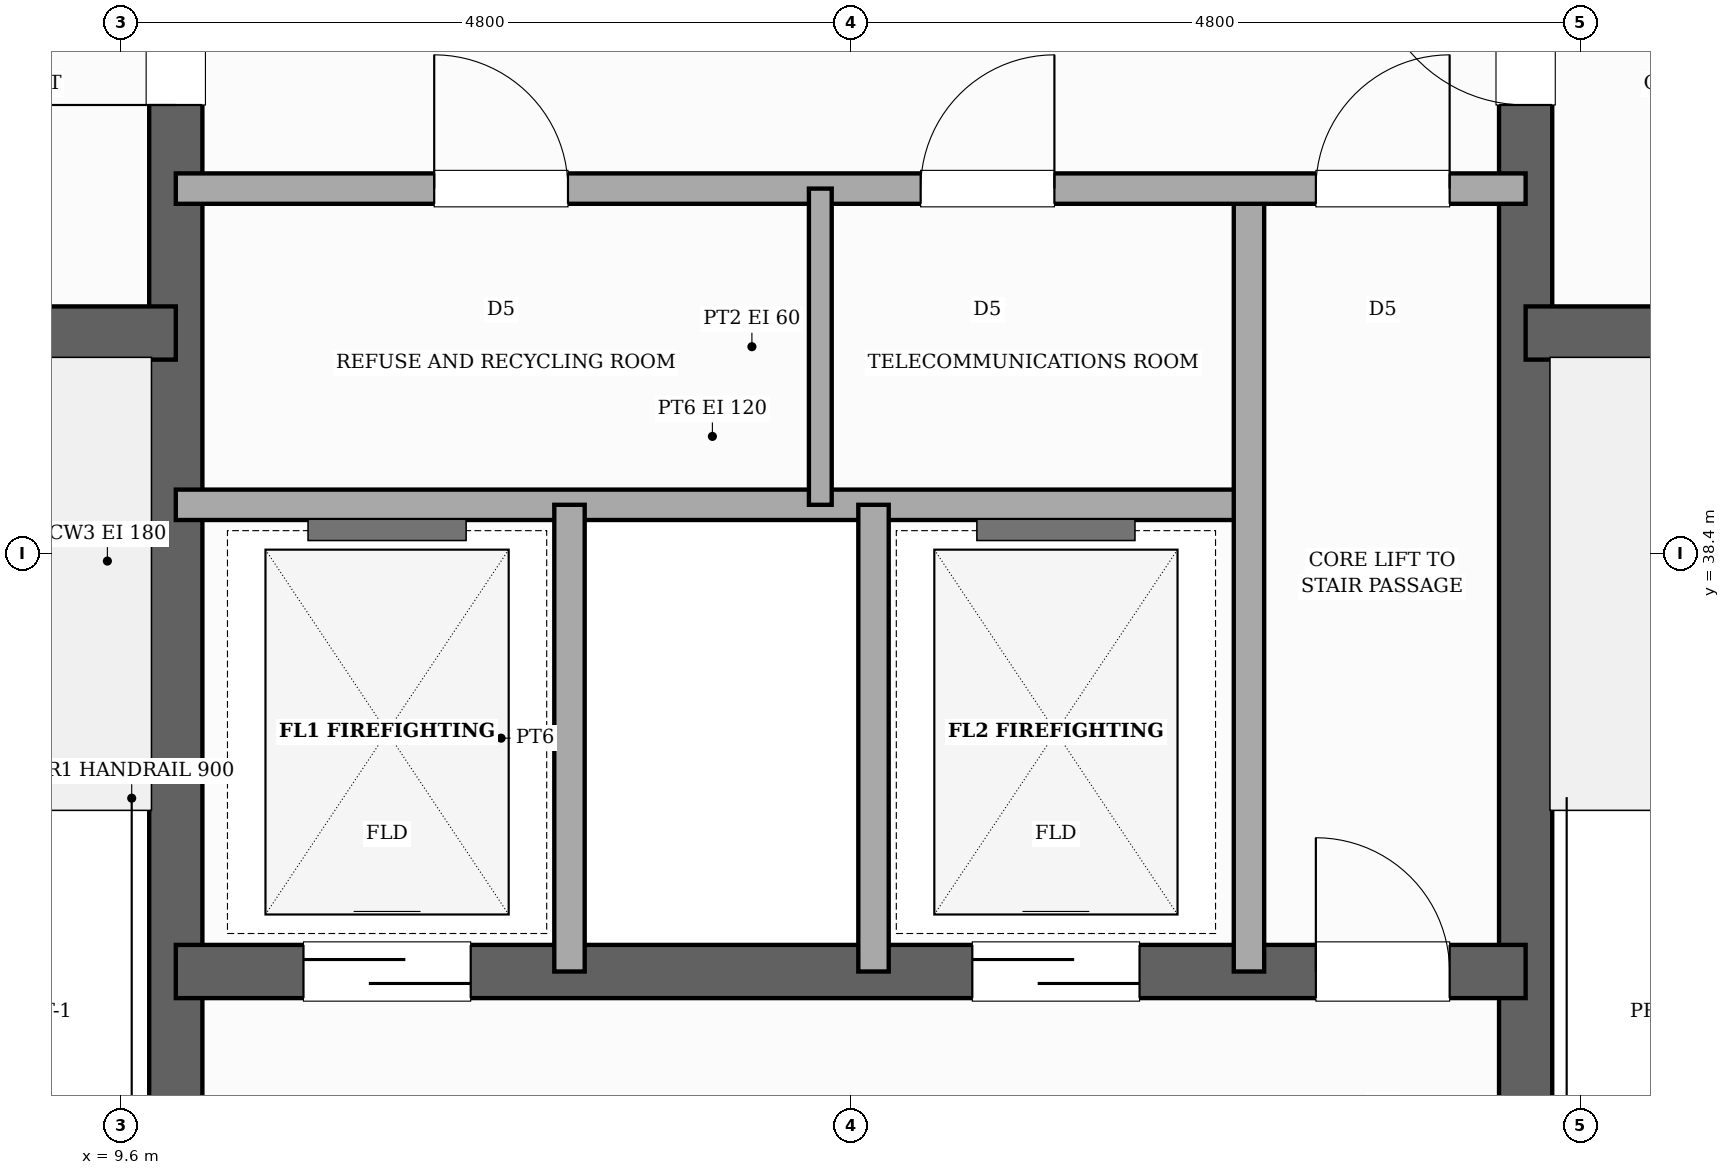
"""IFC4 building model, lengths in metres.
Left out: names, types, materials, properties, quantities, classifications, styles, units other than length and angle.
Written with IfcOpenShell. Run it as: python <this file> out.ifc"""

import sys

from ifc_helpers import new_model, si_unit, direction, frame, frame_2d, origin, place, context, subcontext, project, spatial, rectangle, extrude, element, fill, save


model = new_model("IFC4")
c1 = context("Model", 3, precision=1e-05, world=origin(), true_north=direction((0.0, 1.0)))
c2 = subcontext(c1, "Body", "Model", "MODEL_VIEW")
j1 = project(units=[si_unit("LENGTHUNIT", "METRE"), si_unit("PLANEANGLEUNIT", "RADIAN")], contexts=[c1])
p1 = place(None, origin())
s1 = spatial("IfcSite", under=j1, at=p1, CompositionType="ELEMENT")
p2 = place(p1, origin())
s2 = spatial("IfcBuilding", under=s1, at=p2, CompositionType="ELEMENT")
p3 = place(p2, origin())
s3 = spatial("IfcBuildingStorey", under=s2, at=p3, CompositionType="ELEMENT", Elevation=0.0)
p4 = place(p3, frame((9.96, 30.9, 0.0), z_axis=(0.0, 0.0, 1.0), x_axis=(0.0, 1.0, 0.0)))
e1 = element("IfcWall", 1, at=p4, inside=s3, PredefinedType="SHEAR", context=c2, shape_type="SweptSolid", body=[
    extrude(rectangle(XDim=14.9, YDim=0.35, at=frame_2d((7.45, 0.0))), origin(), (0.0, 0.0, 1.0), 5.2),
])
p5 = place(p4, frame((0.65, 0.0, 0.0)))
e2 = element("IfcOpeningElement", 2, at=p5, cuts=e1, PredefinedType="OPENING", context=c2, shape_type="SweptSolid", body=[
    extrude(rectangle(XDim=0.95, YDim=2.1, at=frame_2d((0.475, 1.05))), frame((0.0, 0.185, 0.0), z_axis=(0.0, -1.0, 0.0), x_axis=(1.0, 0.0, 0.0)), (0.0, 0.0, 1.0), 0.37),
])
p6 = place(p4, frame((10.45, 0.0, 0.0)))
e3 = element("IfcOpeningElement", 3, at=p6, cuts=e1, PredefinedType="OPENING", context=c2, shape_type="SweptSolid", body=[
    extrude(rectangle(XDim=1.0, YDim=2.15, at=frame_2d((0.5, 1.075))), frame((0.0, 0.185, 0.0), z_axis=(0.0, -1.0, 0.0), x_axis=(1.0, 0.0, 0.0)), (0.0, 0.0, 1.0), 0.37),
])
p7 = place(p3, frame((18.84, 30.9, 0.0), z_axis=(0.0, 0.0, 1.0), x_axis=(0.0, 1.0, 0.0)))
e4 = element("IfcWall", 4, at=p7, inside=s3, PredefinedType="SHEAR", context=c2, shape_type="SweptSolid", body=[
    extrude(rectangle(XDim=14.9, YDim=0.35, at=frame_2d((7.45, 0.0))), origin(), (0.0, 0.0, 1.0), 5.2),
])
p8 = place(p7, frame((0.65, 0.0, 0.0)))
e5 = element("IfcOpeningElement", 5, at=p8, cuts=e4, PredefinedType="OPENING", context=c2, shape_type="SweptSolid", body=[
    extrude(rectangle(XDim=0.95, YDim=2.1, at=frame_2d((0.475, 1.05))), frame((0.0, 0.185, 0.0), z_axis=(0.0, -1.0, 0.0), x_axis=(1.0, 0.0, 0.0)), (0.0, 0.0, 1.0), 0.37),
])
p9 = place(p7, frame((10.45, 0.0, 0.0)))
e6 = element("IfcOpeningElement", 6, at=p9, cuts=e4, PredefinedType="OPENING", context=c2, shape_type="SweptSolid", body=[
    extrude(rectangle(XDim=1.0, YDim=2.15, at=frame_2d((0.5, 1.075))), frame((0.0, 0.185, 0.0), z_axis=(0.0, -1.0, 0.0), x_axis=(1.0, 0.0, 0.0)), (0.0, 0.0, 1.0), 0.37),
])
for number, where, z_axis, x_axis in (
    (7, (6.05, 39.85, 0.0), (0.0, 0.0, 1.0), (1.0, 0.0, 0.0)),
    (8, (18.84, 39.85, 0.0), (0.0, 0.0, 1.0), (1.0, 0.0, 0.0)),
):
    element("IfcWall", number, at=place(p3, frame(where, z_axis=z_axis, x_axis=x_axis)), inside=s3, PredefinedType="SHEAR", context=c2, shape_type="SweptSolid", body=[
        extrude(rectangle(XDim=3.91, YDim=0.35, at=frame_2d((1.955, 0.0))), origin(), (0.0, 0.0, 1.0), 5.2),
    ])
p10 = place(p3, frame((9.96, 35.65, 0.0), z_axis=(0.0, 0.0, 1.0), x_axis=(1.0, 0.0, 0.0)))
e9 = element("IfcWall", 9, at=p10, inside=s3, PredefinedType="SHEAR", context=c2, shape_type="SweptSolid", body=[
    extrude(rectangle(XDim=8.88, YDim=0.35, at=frame_2d((4.44, 0.0))), origin(), (0.0, 0.0, 1.0), 5.2),
])
p11 = place(p10, frame((0.84, 0.0, 0.0)))
e10 = element("IfcOpeningElement", 10, at=p11, cuts=e9, PredefinedType="OPENING", context=c2, shape_type="SweptSolid", body=[
    extrude(rectangle(XDim=1.1, YDim=2.15, at=frame_2d((0.55, 1.075))), frame((0.0, 0.185, 0.0), z_axis=(0.0, -1.0, 0.0), x_axis=(1.0, 0.0, 0.0)), (0.0, 0.0, 1.0), 0.37),
])
p12 = place(p10, frame((5.24, 0.0, 0.0)))
e11 = element("IfcOpeningElement", 11, at=p12, cuts=e9, PredefinedType="OPENING", context=c2, shape_type="SweptSolid", body=[
    extrude(rectangle(XDim=1.1, YDim=2.15, at=frame_2d((0.55, 1.075))), frame((0.0, 0.185, 0.0), z_axis=(0.0, -1.0, 0.0), x_axis=(1.0, 0.0, 0.0)), (0.0, 0.0, 1.0), 0.37),
])
p13 = place(p10, frame((7.5, 0.0, 0.0)))
e12 = element("IfcOpeningElement", 12, at=p13, cuts=e9, PredefinedType="OPENING", context=c2, shape_type="SweptSolid", body=[
    extrude(rectangle(XDim=0.88, YDim=2.1, at=frame_2d((0.44, 1.05))), frame((0.0, 0.185, 0.0), z_axis=(0.0, -1.0, 0.0), x_axis=(1.0, 0.0, 0.0)), (0.0, 0.0, 1.0), 0.37),
])
p14 = place(p3, frame((9.96, 38.72, 0.0), z_axis=(0.0, 0.0, 1.0), x_axis=(1.0, 0.0, 0.0)))
e13 = element("IfcWall", 13, at=p14, inside=s3, PredefinedType="POLYGONAL", context=c2, shape_type="SweptSolid", body=[
    extrude(rectangle(XDim=7.06, YDim=0.2, at=frame_2d((3.53, 0.0))), origin(), (0.0, 0.0, 1.0), 4.89),
])
for number, where, z_axis, x_axis in (
    (14, (12.55, 35.65, 0.0), (0.0, 0.0, 1.0), (0.0, 1.0, 0.0)),
    (15, (14.55, 35.65, 0.0), (0.0, 0.0, 1.0), (0.0, 1.0, 0.0)),
):
    element("IfcWall", number, at=place(p3, frame(where, z_axis=z_axis, x_axis=x_axis)), inside=s3, PredefinedType="POLYGONAL", context=c2, shape_type="SweptSolid", body=[
        extrude(rectangle(XDim=3.07, YDim=0.2, at=frame_2d((1.535, 0.0))), origin(), (0.0, 0.0, 1.0), 4.89),
    ])
p15 = place(p3, frame((17.02, 35.65, 0.0), z_axis=(0.0, 0.0, 1.0), x_axis=(0.0, 1.0, 0.0)))
e16 = element("IfcWall", 16, at=p15, inside=s3, PredefinedType="POLYGONAL", context=c2, shape_type="SweptSolid", body=[
    extrude(rectangle(XDim=5.15, YDim=0.2, at=frame_2d((2.575, 0.0))), origin(), (0.0, 0.0, 1.0), 4.89),
])
p16 = place(p3, frame((9.96, 40.8, 0.0), z_axis=(0.0, 0.0, 1.0), x_axis=(1.0, 0.0, 0.0)))
e17 = element("IfcWall", 17, at=p16, inside=s3, PredefinedType="POLYGONAL", context=c2, shape_type="SweptSolid", body=[
    extrude(rectangle(XDim=8.88, YDim=0.2, at=frame_2d((4.44, 0.0))), origin(), (0.0, 0.0, 1.0), 4.89),
])
p17 = place(p16, frame((7.5, 0.0, 0.0)))
e18 = element("IfcOpeningElement", 18, at=p17, cuts=e17, PredefinedType="OPENING", context=c2, shape_type="SweptSolid", body=[
    extrude(rectangle(XDim=0.88, YDim=2.1, at=frame_2d((0.44, 1.05))), frame((0.0, 0.11, 0.0), z_axis=(0.0, -1.0, 0.0), x_axis=(1.0, 0.0, 0.0)), (0.0, 0.0, 1.0), 0.22),
])
p18 = place(p16, frame((1.7, 0.0, 0.0)))
e19 = element("IfcOpeningElement", 19, at=p18, cuts=e17, PredefinedType="OPENING", context=c2, shape_type="SweptSolid", body=[
    extrude(rectangle(XDim=0.88, YDim=2.1, at=frame_2d((0.44, 1.05))), frame((0.0, 0.11, 0.0), z_axis=(0.0, -1.0, 0.0), x_axis=(1.0, 0.0, 0.0)), (0.0, 0.0, 1.0), 0.22),
])
p19 = place(p16, frame((4.9, 0.0, 0.0)))
e20 = element("IfcOpeningElement", 20, at=p19, cuts=e17, PredefinedType="OPENING", context=c2, shape_type="SweptSolid", body=[
    extrude(rectangle(XDim=0.88, YDim=2.1, at=frame_2d((0.44, 1.05))), frame((0.0, 0.11, 0.0), z_axis=(0.0, -1.0, 0.0), x_axis=(1.0, 0.0, 0.0)), (0.0, 0.0, 1.0), 0.22),
])
p20 = place(p3, frame((14.2, 38.72, 0.0), z_axis=(0.0, 0.0, 1.0), x_axis=(0.0, 1.0, 0.0)))
e21 = element("IfcWall", 21, at=p20, inside=s3, PredefinedType="PARTITIONING", context=c2, shape_type="SweptSolid", body=[
    extrude(rectangle(XDim=2.08, YDim=0.15, at=frame_2d((1.04, 0.0))), origin(), (0.0, 0.0, 1.0), 4.89),
])
p21 = place(p11, origin())
e22 = element("IfcDoor", 22, at=p21, inside=s3, OperationType="SLIDING_TO_LEFT", PredefinedType="DOOR", context=c2, shape_type="SweptSolid", body=[
    extrude(rectangle(XDim=1.1, YDim=2.15, at=frame_2d((0.55, 1.075))), frame((0.0, 0.025, 0.0), z_axis=(0.0, -1.0, 0.0), x_axis=(1.0, 0.0, 0.0)), (0.0, 0.0, 1.0), 0.05),
])
fill(e10, e22)
p22 = place(p12, origin())
e23 = element("IfcDoor", 23, at=p22, inside=s3, OperationType="SLIDING_TO_RIGHT", PredefinedType="DOOR", context=c2, shape_type="SweptSolid", body=[
    extrude(rectangle(XDim=1.1, YDim=2.15, at=frame_2d((0.55, 1.075))), frame((0.0, 0.025, 0.0), z_axis=(0.0, -1.0, 0.0), x_axis=(1.0, 0.0, 0.0)), (0.0, 0.0, 1.0), 0.05),
])
fill(e11, e23)
p23 = place(p13, origin())
e24 = element("IfcDoor", 24, at=p23, inside=s3, OperationType="SINGLE_SWING_LEFT", PredefinedType="DOOR", context=c2, shape_type="SweptSolid", body=[
    extrude(rectangle(XDim=0.88, YDim=2.1, at=frame_2d((0.44, 1.05))), frame((0.0, 0.025, 0.0), z_axis=(0.0, -1.0, 0.0), x_axis=(1.0, 0.0, 0.0)), (0.0, 0.0, 1.0), 0.05),
])
fill(e12, e24)
p24 = place(p17, origin())
e25 = element("IfcDoor", 25, at=p24, inside=s3, OperationType="SINGLE_SWING_RIGHT", PredefinedType="DOOR", context=c2, shape_type="SweptSolid", body=[
    extrude(rectangle(XDim=0.88, YDim=2.1, at=frame_2d((0.44, 1.05))), frame((0.0, 0.025, 0.0), z_axis=(0.0, -1.0, 0.0), x_axis=(1.0, 0.0, 0.0)), (0.0, 0.0, 1.0), 0.05),
])
fill(e18, e25)
p25 = place(p6, origin())
e26 = element("IfcDoor", 26, at=p25, inside=s3, OperationType="SINGLE_SWING_LEFT", PredefinedType="DOOR", context=c2, shape_type="SweptSolid", body=[
    extrude(rectangle(XDim=1.0, YDim=2.15, at=frame_2d((0.5, 1.075))), frame((0.0, 0.025, 0.0), z_axis=(0.0, -1.0, 0.0), x_axis=(1.0, 0.0, 0.0)), (0.0, 0.0, 1.0), 0.05),
])
fill(e3, e26)
p26 = place(p9, origin())
e27 = element("IfcDoor", 27, at=p26, inside=s3, OperationType="SINGLE_SWING_RIGHT", PredefinedType="DOOR", context=c2, shape_type="SweptSolid", body=[
    extrude(rectangle(XDim=1.0, YDim=2.15, at=frame_2d((0.5, 1.075))), frame((0.0, 0.025, 0.0), z_axis=(0.0, -1.0, 0.0), x_axis=(1.0, 0.0, 0.0)), (0.0, 0.0, 1.0), 0.05),
])
fill(e6, e27)
p27 = place(p18, origin())
e28 = element("IfcDoor", 28, at=p27, inside=s3, OperationType="SINGLE_SWING_LEFT", PredefinedType="DOOR", context=c2, shape_type="SweptSolid", body=[
    extrude(rectangle(XDim=0.88, YDim=2.1, at=frame_2d((0.44, 1.05))), frame((0.0, 0.025, 0.0), z_axis=(0.0, -1.0, 0.0), x_axis=(1.0, 0.0, 0.0)), (0.0, 0.0, 1.0), 0.05),
])
fill(e19, e28)
p28 = place(p19, origin())
e29 = element("IfcDoor", 29, at=p28, inside=s3, OperationType="SINGLE_SWING_RIGHT", PredefinedType="DOOR", context=c2, shape_type="SweptSolid", body=[
    extrude(rectangle(XDim=0.88, YDim=2.1, at=frame_2d((0.44, 1.05))), frame((0.0, 0.025, 0.0), z_axis=(0.0, -1.0, 0.0), x_axis=(1.0, 0.0, 0.0)), (0.0, 0.0, 1.0), 0.05),
])
fill(e20, e29)
save(model, sys.argv[1])
